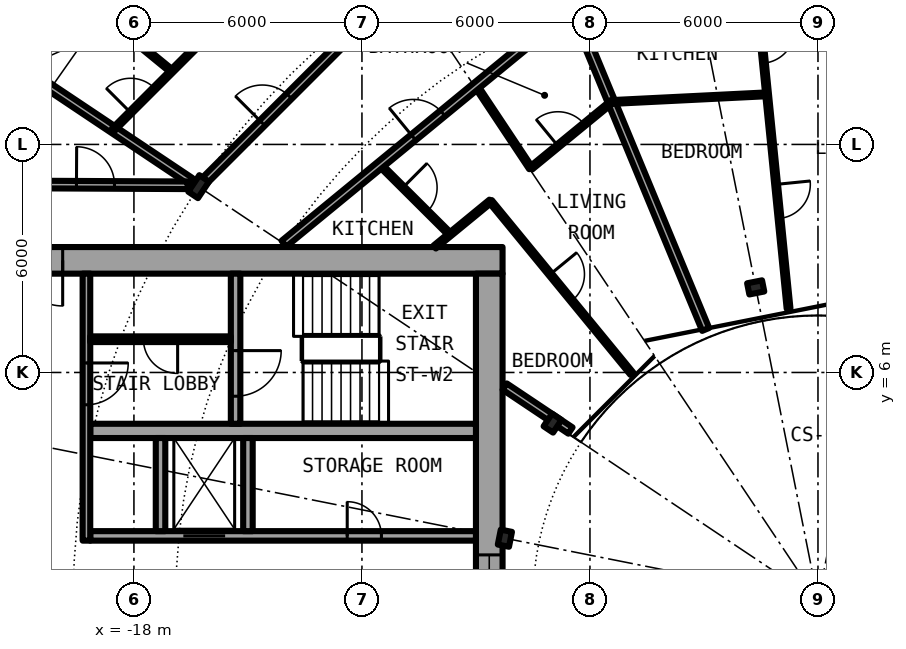
"""IFC4 building model, lengths in metres.
Left out: names, types, materials, properties, quantities, classifications, styles, units other than length and angle.
Written with IfcOpenShell. Run it as: python <this file> out.ifc"""

import sys

from ifc_helpers import new_model, si_unit, direction, frame, frame_2d, origin, origin_2d, place, context, subcontext, project, spatial, rectangle, i_section, extrude, element, fill, save


model = new_model("IFC4")
c1 = context("Model", 3, precision=1e-05, world=origin(), true_north=direction((0.0, 1.0)))
c2 = subcontext(c1, "Body", "Model", "MODEL_VIEW")
j1 = project(units=[si_unit("LENGTHUNIT", "METRE"), si_unit("PLANEANGLEUNIT", "RADIAN")], contexts=[c1])
p1 = place(None, origin())
s1 = spatial("IfcSite", under=j1, at=p1, CompositionType="ELEMENT")
p2 = place(p1, origin())
s2 = spatial("IfcBuilding", under=s1, at=p2, CompositionType="ELEMENT")
p3 = place(p2, frame((0.0, 0.0, 69.7)))
s3 = spatial("IfcBuildingStorey", under=s2, at=p3, CompositionType="ELEMENT", Elevation=69.7)
p4 = place(p3, frame((-16.297, 10.889, 0.0), z_axis=(0.0, 0.0, 1.0), x_axis=(-0.831469612303, 0.55557023302, 0.0)))
e1 = element("IfcColumn", 1, at=p4, inside=s3, PredefinedType="COLUMN", context=c2, shape_type="SweptSolid", body=[
    extrude(i_section(OverallWidth=0.306, OverallDepth=0.524, WebThickness=0.021, FlangeThickness=0.04, FilletRadius=0.027, at=origin_2d()), origin(), (0.0, 0.0, 1.0), 3.05),
])
for number, where, z_axis, x_axis in (
    (2, (-1.639, 8.239, 0.0), (0.0, 0.0, 1.0), (-0.195, 0.981, 0.0)),
    (3, (-6.984, 4.667, 0.0), (0.0, 0.0, 1.0), (-0.831, 0.556, 0.0)),
    (4, (-8.239, 1.639, 0.0), (0.0, 0.0, 1.0), (-0.981, 0.195, 0.0)),
):
    element("IfcColumn", number, at=place(p3, frame(where, z_axis=z_axis, x_axis=x_axis)), inside=s3, PredefinedType="COLUMN", context=c2, shape_type="SweptSolid", body=[
        extrude(i_section(OverallWidth=0.3, OverallDepth=0.4, WebThickness=0.013, FlangeThickness=0.024, FilletRadius=0.027, at=origin_2d()), origin(), (0.0, 0.0, 1.0), 3.05),
    ])
p5 = place(p3, frame((-8.3, 8.95, 0.0), z_axis=(0.0, 0.0, 1.0), x_axis=(-1.0, 0.0, 0.0)))
e5 = element("IfcWall", 5, at=p5, inside=s3, PredefinedType="SHEAR", context=c2, shape_type="SweptSolid", body=[
    extrude(rectangle(XDim=14.0, YDim=0.7, at=frame_2d((7.0, 0.0))), origin(), (0.0, 0.0, 1.0), 3.05),
])
p6 = place(p5, frame((11.575, 0.0, 0.0)))
e6 = element("IfcOpeningElement", 6, at=p6, cuts=e5, PredefinedType="OPENING", context=c2, shape_type="SweptSolid", body=[
    extrude(rectangle(XDim=1.2, YDim=2.3, at=frame_2d((0.6, 1.15))), frame((0.0, 0.36, 0.0), z_axis=(0.0, -1.0, 0.0), x_axis=(1.0, 0.0, 0.0)), (0.0, 0.0, 1.0), 0.72),
])
p7 = place(p3, frame((-8.65, 8.6, 0.0), z_axis=(0.0, 0.0, 1.0), x_axis=(0.0, -1.0, 0.0)))
e7 = element("IfcWall", 7, at=p7, inside=s3, PredefinedType="SHEAR", context=c2, shape_type="SweptSolid", body=[
    extrude(rectangle(XDim=17.2, YDim=0.7, at=frame_2d((8.6, 0.0))), origin(), (0.0, 0.0, 1.0), 3.05),
])
p8 = place(p7, frame((7.4, 0.0, 0.1)))
e8 = element("IfcOpeningElement", 8, at=p8, cuts=e7, PredefinedType="OPENING", context=c2, shape_type="SweptSolid", body=[
    extrude(rectangle(XDim=2.4, YDim=2.2, at=frame_2d((1.2, 1.1))), frame((0.0, 0.36, 0.0), z_axis=(0.0, -1.0, 0.0), x_axis=(1.0, 0.0, 0.0)), (0.0, 0.0, 1.0), 0.72),
])
p9 = place(p3, frame((-19.15, 1.7, 0.0), z_axis=(0.0, 0.0, 1.0), x_axis=(1.0, 0.0, 0.0)))
e9 = element("IfcWall", 9, at=p9, inside=s3, PredefinedType="SHEAR", context=c2, shape_type="SweptSolid", body=[
    extrude(rectangle(XDim=10.15, YDim=0.25, at=frame_2d((5.075, 0.0))), origin(), (0.0, 0.0, 1.0), 3.05),
])
p10 = place(p9, frame((2.45, 0.0, 0.0)))
e10 = element("IfcOpeningElement", 10, at=p10, cuts=e9, PredefinedType="OPENING", context=c2, shape_type="SweptSolid", body=[
    extrude(rectangle(XDim=1.1, YDim=2.3, at=frame_2d((0.55, 1.15))), frame((0.0, 0.135, 0.0), z_axis=(0.0, -1.0, 0.0), x_axis=(1.0, 0.0, 0.0)), (0.0, 0.0, 1.0), 0.27),
])
p11 = place(p9, frame((6.762, 0.0, 0.0)))
e11 = element("IfcOpeningElement", 11, at=p11, cuts=e9, PredefinedType="OPENING", context=c2, shape_type="SweptSolid", body=[
    extrude(rectangle(XDim=0.9, YDim=2.3, at=frame_2d((0.45, 1.15))), frame((0.0, 0.135, 0.0), z_axis=(0.0, -1.0, 0.0), x_axis=(1.0, 0.0, 0.0)), (0.0, 0.0, 1.0), 0.27),
])
p12 = place(p3, frame((-9.0, 4.462, 0.0), z_axis=(0.0, 0.0, 1.0), x_axis=(-1.0, 0.0, 0.0)))
e12 = element("IfcWall", 12, at=p12, inside=s3, PredefinedType="SHEAR", context=c2, shape_type="SweptSolid", body=[
    extrude(rectangle(XDim=10.15, YDim=0.375, at=frame_2d((5.075, 0.0))), origin(), (0.0, 0.0, 1.0), 3.05),
])
p13 = place(p3, frame((-15.325, 8.6, 0.0), z_axis=(0.0, 0.0, 1.0), x_axis=(0.0, -1.0, 0.0)))
e13 = element("IfcWall", 13, at=p13, inside=s3, PredefinedType="SHEAR", context=c2, shape_type="SweptSolid", body=[
    extrude(rectangle(XDim=3.95, YDim=0.25, at=frame_2d((1.975, 0.0))), origin(), (0.0, 0.0, 1.0), 3.05),
])
p14 = place(p13, frame((2.025, 0.0, 0.0)))
e14 = element("IfcOpeningElement", 14, at=p14, cuts=e13, PredefinedType="OPENING", context=c2, shape_type="SweptSolid", body=[
    extrude(rectangle(XDim=1.2, YDim=2.3, at=frame_2d((0.6, 1.15))), frame((0.0, 0.135, 0.0), z_axis=(0.0, -1.0, 0.0), x_axis=(1.0, 0.0, 0.0)), (0.0, 0.0, 1.0), 0.27),
])
for number, where, z_axis, x_axis in (
    (15, (-15.0, 1.825, 0.0), (0.0, 0.0, 1.0), (0.0, 1.0, 0.0)),
    (16, (-17.3, 1.825, 0.0), (0.0, 0.0, 1.0), (0.0, 1.0, 0.0)),
):
    element("IfcWall", number, at=place(p3, frame(where, z_axis=z_axis, x_axis=x_axis)), inside=s3, PredefinedType="SOLIDWALL", context=c2, shape_type="SweptSolid", body=[
        extrude(rectangle(XDim=2.45, YDim=0.25, at=frame_2d((1.225, 0.0))), origin(), (0.0, 0.0, 1.0), 2.7),
    ])
p15 = place(p3, frame((-19.25, 8.6, 0.0), z_axis=(0.0, 0.0, 1.0), x_axis=(0.0, -1.0, 0.0)))
e17 = element("IfcWall", 17, at=p15, inside=s3, PredefinedType="SOLIDWALL", context=c2, shape_type="SweptSolid", body=[
    extrude(rectangle(XDim=7.025, YDim=0.2, at=frame_2d((3.513, 0.0))), origin(), (0.0, 0.0, 1.0), 2.7),
])
p16 = place(p15, frame((2.35, 0.0, 0.0)))
e18 = element("IfcOpeningElement", 18, at=p16, cuts=e17, PredefinedType="OPENING", context=c2, shape_type="SweptSolid", body=[
    extrude(rectangle(XDim=1.1, YDim=2.3, at=frame_2d((0.55, 1.15))), frame((0.0, 0.11, 0.0), z_axis=(0.0, -1.0, 0.0), x_axis=(1.0, 0.0, 0.0)), (0.0, 0.0, 1.0), 0.22),
])
p17 = place(p3, frame((-15.45, 6.875, 0.0), z_axis=(0.0, 0.0, 1.0), x_axis=(-1.0, 0.0, 0.0)))
e19 = element("IfcWall", 19, at=p17, inside=s3, PredefinedType="PARTITIONING", context=c2, shape_type="SweptSolid", body=[
    extrude(rectangle(XDim=3.7, YDim=0.15, at=frame_2d((1.85, 0.0))), origin(), (0.0, 0.0, 1.0), 2.7),
])
p18 = place(p17, frame((1.4, 0.0, 0.0)))
e20 = element("IfcOpeningElement", 20, at=p18, cuts=e19, PredefinedType="OPENING", context=c2, shape_type="SweptSolid", body=[
    extrude(rectangle(XDim=0.9, YDim=2.3, at=frame_2d((0.45, 1.15))), frame((0.0, 0.085, 0.0), z_axis=(0.0, -1.0, 0.0), x_axis=(1.0, 0.0, 0.0)), (0.0, 0.0, 1.0), 0.17),
])
p19 = place(p3, frame((-22.595, 15.098, 0.0), z_axis=(0.0, 0.0, 1.0), x_axis=(0.831382022135, -0.555701298605, 0.0)))
e21 = element("IfcWall", 21, at=p19, inside=s3, PredefinedType="PARTITIONING", context=c2, shape_type="SweptSolid", body=[
    extrude(rectangle(XDim=7.313, YDim=0.2, at=frame_2d((3.657, 0.0))), origin(), (0.0, 0.0, 1.0), 2.7),
])
p20 = place(p3, frame((-21.023, 17.22, 0.0), z_axis=(0.0, 0.0, 1.0), x_axis=(0.773517471898, -0.633774976367, 0.0)))
e22 = element("IfcWall", 22, at=p20, inside=s3, PredefinedType="PARTITIONING", context=c2, shape_type="SweptSolid", body=[
    extrude(rectangle(XDim=5.196, YDim=0.1, at=frame_2d((2.598, 0.0))), origin(), (0.0, 0.0, 1.0), 2.7),
])
p21 = place(p3, frame((-11.524, 11.464, 0.0), z_axis=(0.0, 0.0, 1.0), x_axis=(0.708796844581, -0.705412668665, 0.0)))
e23 = element("IfcWall", 23, at=p21, inside=s3, PredefinedType="PARTITIONING", context=c2, shape_type="SweptSolid", body=[
    extrude(rectangle(XDim=2.597, YDim=0.1, at=frame_2d((1.299, 0.0))), origin(), (0.0, 0.0, 1.0), 2.7),
])
p22 = place(p21, frame((0.849, 0.0, 0.0)))
e24 = element("IfcOpeningElement", 24, at=p22, cuts=e23, PredefinedType="OPENING", context=c2, shape_type="SweptSolid", body=[
    extrude(rectangle(XDim=0.9, YDim=2.3, at=frame_2d((0.45, 1.15))), frame((0.0, 0.06, 0.0), z_axis=(0.0, -1.0, 0.0), x_axis=(1.0, 0.0, 0.0)), (0.0, 0.0, 1.0), 0.12),
])
p23 = place(p3, frame((-8.996, 13.539, 0.0), z_axis=(0.0, 0.0, 1.0), x_axis=(0.553615197403, -0.83277260594, 0.0)))
e25 = element("IfcWall", 25, at=p23, inside=s3, PredefinedType="PARTITIONING", context=c2, shape_type="SweptSolid", body=[
    extrude(rectangle(XDim=2.597, YDim=0.1, at=frame_2d((1.299, 0.0))), origin(), (0.0, 0.0, 1.0), 2.7),
])
p24 = place(p3, frame((-8.62, 10.504, 0.0), z_axis=(0.0, 0.0, 1.0), x_axis=(0.634358693064, -0.773038840249, 0.0)))
e26 = element("IfcWall", 26, at=p24, inside=s3, PredefinedType="PARTITIONING", context=c2, shape_type="SweptSolid", body=[
    extrude(rectangle(XDim=5.868, YDim=0.1, at=frame_2d((2.934, 0.0))), origin(), (0.0, 0.0, 1.0), 2.7),
])
p25 = place(p24, frame((2.484, 0.0, 0.0)))
e27 = element("IfcOpeningElement", 27, at=p25, cuts=e26, PredefinedType="OPENING", context=c2, shape_type="SweptSolid", body=[
    extrude(rectangle(XDim=0.9, YDim=2.3, at=frame_2d((0.45, 1.15))), frame((0.0, 0.06, 0.0), z_axis=(0.0, -1.0, 0.0), x_axis=(1.0, 0.0, 0.0)), (0.0, 0.0, 1.0), 0.12),
])
p26 = place(p3, frame((-6.468, 15.614, 0.0), z_axis=(0.0, 0.0, 1.0), x_axis=(0.382646942224, -0.923894646378, 0.0)))
e28 = element("IfcWall", 28, at=p26, inside=s3, PredefinedType="PARTITIONING", context=c2, shape_type="SweptSolid", body=[
    extrude(rectangle(XDim=9.181, YDim=0.2, at=frame_2d((4.59, 0.0))), origin(), (0.0, 0.0, 1.0), 2.7),
])
p27 = place(p3, frame((-1.593, 15.853, 0.0), z_axis=(0.0, 0.0, 1.0), x_axis=(0.099730339513, -0.995014502096, 0.0)))
e29 = element("IfcWall", 29, at=p27, inside=s3, PredefinedType="PARTITIONING", context=c2, shape_type="SweptSolid", body=[
    extrude(rectangle(XDim=8.213, YDim=0.1, at=frame_2d((4.106, 0.0))), origin(), (0.0, 0.0, 1.0), 2.7),
])
p28 = place(p27, frame((0.823, 0.0, 0.0)))
e30 = element("IfcOpeningElement", 30, at=p28, cuts=e29, PredefinedType="OPENING", context=c2, shape_type="SweptSolid", body=[
    extrude(rectangle(XDim=0.9, YDim=2.3, at=frame_2d((0.45, 1.15))), frame((0.0, 0.06, 0.0), z_axis=(0.0, -1.0, 0.0), x_axis=(1.0, 0.0, 0.0)), (0.0, 0.0, 1.0), 0.12),
])
p29 = place(p27, frame((4.929, 0.0, 0.0)))
e31 = element("IfcOpeningElement", 31, at=p29, cuts=e29, PredefinedType="OPENING", context=c2, shape_type="SweptSolid", body=[
    extrude(rectangle(XDim=0.9, YDim=2.3, at=frame_2d((0.45, 1.15))), frame((0.0, 0.06, 0.0), z_axis=(0.0, -1.0, 0.0), x_axis=(1.0, 0.0, 0.0)), (0.0, 0.0, 1.0), 0.12),
])
p30 = place(p3, frame((-6.513, 4.472, 0.0), z_axis=(0.0, 0.0, 1.0), x_axis=(-0.831382204863, 0.555701025225, 0.0)))
e32 = element("IfcWall", 32, at=p30, inside=s3, PredefinedType="PARTITIONING", context=c2, shape_type="SweptSolid", body=[
    extrude(rectangle(XDim=2.082, YDim=0.2, at=frame_2d((1.041, 0.0))), origin(), (0.0, 0.0, 1.0), 2.7),
])
p31 = place(p3, frame((-21.675, 10.95, 0.0), z_axis=(0.0, 0.0, 1.0), x_axis=(0.999988019025, -0.004895079807, 0.0)))
e33 = element("IfcWall", 33, at=p31, inside=s3, PredefinedType="PARTITIONING", context=c2, shape_type="SweptSolid", body=[
    extrude(rectangle(XDim=5.087, YDim=0.2, at=frame_2d((2.543, 0.0))), origin(), (0.0, 0.0, 1.0), 2.7),
])
p32 = place(p31, frame((2.163, 0.0, 0.0)))
e34 = element("IfcOpeningElement", 34, at=p32, cuts=e33, PredefinedType="OPENING", context=c2, shape_type="SweptSolid", body=[
    extrude(rectangle(XDim=1.0, YDim=2.3, at=frame_2d((0.5, 1.15))), frame((0.0, 0.11, 0.0), z_axis=(0.0, -1.0, 0.0), x_axis=(1.0, 0.0, 0.0)), (0.0, 0.0, 1.0), 0.22),
])
p33 = place(p3, frame((-5.439, 13.116, 0.0), z_axis=(0.0, 0.0, 1.0), x_axis=(0.998772010578, 0.049542616872, 0.0)))
e35 = element("IfcWall", 35, at=p33, inside=s3, PredefinedType="PARTITIONING", context=c2, shape_type="SweptSolid", body=[
    extrude(rectangle(XDim=4.1, YDim=0.1, at=frame_2d((2.05, 0.0))), origin(), (0.0, 0.0, 1.0), 2.7),
])
p34 = place(p3, frame((-10.087, 9.3, 0.0), z_axis=(0.0, 0.0, 1.0), x_axis=(0.772957368531, 0.6344579627, 0.0)))
e36 = element("IfcWall", 36, at=p34, inside=s3, PredefinedType="PARTITIONING", context=c2, shape_type="SweptSolid", body=[
    extrude(rectangle(XDim=1.906, YDim=0.1, at=frame_2d((0.953, 0.0))), origin(), (0.0, 0.0, 1.0), 2.7),
])
p35 = place(p3, frame((-7.552, 11.379, 0.0), z_axis=(0.0, 0.0, 1.0), x_axis=(0.773323547924, 0.634011585246, 0.0)))
e37 = element("IfcWall", 37, at=p35, inside=s3, PredefinedType="PARTITIONING", context=c2, shape_type="SweptSolid", body=[
    extrude(rectangle(XDim=2.748, YDim=0.1, at=frame_2d((1.374, 0.0))), origin(), (0.0, 0.0, 1.0), 2.7),
])
p36 = place(p35, frame((0.917, 0.0, 0.0)))
e38 = element("IfcOpeningElement", 38, at=p36, cuts=e37, PredefinedType="OPENING", context=c2, shape_type="SweptSolid", body=[
    extrude(rectangle(XDim=0.9, YDim=2.3, at=frame_2d((0.45, 1.15))), frame((0.0, 0.06, 0.0), z_axis=(0.0, -1.0, 0.0), x_axis=(1.0, 0.0, 0.0)), (0.0, 0.0, 1.0), 0.12),
])
p37 = place(p3, frame((-14.052, 9.389, 0.0), z_axis=(0.0, 0.0, 1.0), x_axis=(0.77292501819, 0.634497372931, 0.0)))
e39 = element("IfcWall", 39, at=p37, inside=s3, PredefinedType="PARTITIONING", context=c2, shape_type="SweptSolid", body=[
    extrude(rectangle(XDim=9.81, YDim=0.2, at=frame_2d((4.905, 0.0))), origin(), (0.0, 0.0, 1.0), 2.7),
])
p38 = place(p37, frame((4.406, 0.0, 0.0)))
e40 = element("IfcOpeningElement", 40, at=p38, cuts=e39, PredefinedType="OPENING", context=c2, shape_type="SweptSolid", body=[
    extrude(rectangle(XDim=1.0, YDim=2.3, at=frame_2d((0.5, 1.15))), frame((0.0, 0.11, 0.0), z_axis=(0.0, -1.0, 0.0), x_axis=(1.0, 0.0, 0.0)), (0.0, 0.0, 1.0), 0.22),
])
p39 = place(p3, frame((-16.186, 11.0, 0.0), z_axis=(0.0, 0.0, 1.0), x_axis=(0.707106781187, 0.707106781187, 0.0)))
e41 = element("IfcWall", 41, at=p39, inside=s3, PredefinedType="PARTITIONING", context=c2, shape_type="SweptSolid", body=[
    extrude(rectangle(XDim=7.334, YDim=0.2, at=frame_2d((3.667, 0.0))), origin(), (0.0, 0.0, 1.0), 2.38),
])
p40 = place(p39, frame((2.211, 0.0, 0.0)))
e42 = element("IfcOpeningElement", 42, at=p40, cuts=e41, PredefinedType="OPENING", context=c2, shape_type="SweptSolid", body=[
    extrude(rectangle(XDim=1.0, YDim=2.3, at=frame_2d((0.5, 1.15))), frame((0.0, 0.11, 0.0), z_axis=(0.0, -1.0, 0.0), x_axis=(1.0, 0.0, 0.0)), (0.0, 0.0, 1.0), 0.22),
])
p41 = place(p3, frame((-18.542, 12.389, 0.0), z_axis=(0.0, 0.0, 1.0), x_axis=(0.707190945535, 0.707022606819, 0.0)))
e43 = element("IfcWall", 43, at=p41, inside=s3, PredefinedType="PARTITIONING", context=c2, shape_type="SweptSolid", body=[
    extrude(rectangle(XDim=4.351, YDim=0.1, at=frame_2d((2.175, 0.0))), origin(), (0.0, 0.0, 1.0), 2.7),
])
p42 = place(p41, frame((0.639, 0.0, 0.0)))
e44 = element("IfcOpeningElement", 44, at=p42, cuts=e43, PredefinedType="OPENING", context=c2, shape_type="SweptSolid", body=[
    extrude(rectangle(XDim=0.9, YDim=2.3, at=frame_2d((0.45, 1.15))), frame((0.0, 0.06, 0.0), z_axis=(0.0, -1.0, 0.0), x_axis=(1.0, 0.0, 0.0)), (0.0, 0.0, 1.0), 0.12),
])
p43 = place(p10, origin())
e45 = element("IfcDoor", 45, at=p43, inside=s3, OperationType="DOUBLE_DOOR_SLIDING", PredefinedType="DOOR", context=c2, shape_type="SweptSolid", body=[
    extrude(rectangle(XDim=1.1, YDim=2.3, at=frame_2d((0.55, 1.15))), frame((0.0, 0.025, 0.0), z_axis=(0.0, -1.0, 0.0), x_axis=(1.0, 0.0, 0.0)), (0.0, 0.0, 1.0), 0.05),
])
fill(e10, e45)
p44 = place(p11, origin())
e46 = element("IfcDoor", 46, at=p44, inside=s3, OperationType="SINGLE_SWING_LEFT", PredefinedType="DOOR", context=c2, shape_type="SweptSolid", body=[
    extrude(rectangle(XDim=0.9, YDim=2.3, at=frame_2d((0.45, 1.15))), frame((0.0, 0.025, 0.0), z_axis=(0.0, -1.0, 0.0), x_axis=(1.0, 0.0, 0.0)), (0.0, 0.0, 1.0), 0.05),
])
fill(e11, e46)
p45 = place(p18, origin())
e47 = element("IfcDoor", 47, at=p45, inside=s3, OperationType="SINGLE_SWING_LEFT", PredefinedType="DOOR", context=c2, shape_type="SweptSolid", body=[
    extrude(rectangle(XDim=0.9, YDim=2.3, at=frame_2d((0.45, 1.15))), frame((0.0, 0.025, 0.0), z_axis=(0.0, -1.0, 0.0), x_axis=(1.0, 0.0, 0.0)), (0.0, 0.0, 1.0), 0.05),
])
fill(e20, e47)
p46 = place(p14, origin())
e48 = element("IfcDoor", 48, at=p46, inside=s3, OperationType="SINGLE_SWING_LEFT", PredefinedType="DOOR", context=c2, shape_type="SweptSolid", body=[
    extrude(rectangle(XDim=1.2, YDim=2.3, at=frame_2d((0.6, 1.15))), frame((0.0, 0.025, 0.0), z_axis=(0.0, -1.0, 0.0), x_axis=(1.0, 0.0, 0.0)), (0.0, 0.0, 1.0), 0.05),
])
fill(e14, e48)
p47 = place(p16, origin())
e49 = element("IfcDoor", 49, at=p47, inside=s3, OperationType="SINGLE_SWING_RIGHT", PredefinedType="DOOR", context=c2, shape_type="SweptSolid", body=[
    extrude(rectangle(XDim=1.1, YDim=2.3, at=frame_2d((0.55, 1.15))), frame((0.0, 0.025, 0.0), z_axis=(0.0, -1.0, 0.0), x_axis=(1.0, 0.0, 0.0)), (0.0, 0.0, 1.0), 0.05),
])
fill(e18, e49)
p48 = place(p6, origin())
e50 = element("IfcDoor", 50, at=p48, inside=s3, OperationType="SINGLE_SWING_LEFT", PredefinedType="DOOR", context=c2, shape_type="SweptSolid", body=[
    extrude(rectangle(XDim=1.2, YDim=2.3, at=frame_2d((0.6, 1.15))), frame((0.0, 0.025, 0.0), z_axis=(0.0, -1.0, 0.0), x_axis=(1.0, 0.0, 0.0)), (0.0, 0.0, 1.0), 0.05),
])
fill(e6, e50)
p49 = place(p8, origin())
e51 = element("IfcWindow", 51, at=p49, inside=s3, PartitioningType="SINGLE_PANEL", PredefinedType="WINDOW", context=c2, shape_type="SweptSolid", body=[
    extrude(rectangle(XDim=2.4, YDim=2.2, at=frame_2d((1.2, 1.1))), frame((0.0, 0.03, 0.0), z_axis=(0.0, -1.0, 0.0), x_axis=(1.0, 0.0, 0.0)), (0.0, 0.0, 1.0), 0.06),
])
fill(e8, e51)
p50 = place(p40, origin())
e52 = element("IfcDoor", 52, at=p50, inside=s3, OperationType="SINGLE_SWING_LEFT", PredefinedType="DOOR", context=c2, shape_type="SweptSolid", body=[
    extrude(rectangle(XDim=1.0, YDim=2.3, at=frame_2d((0.5, 1.15))), frame((0.0, 0.025, 0.0), z_axis=(0.0, -1.0, 0.0), x_axis=(1.0, 0.0, 0.0)), (0.0, 0.0, 1.0), 0.05),
])
fill(e42, e52)
p51 = place(p42, origin())
e53 = element("IfcDoor", 53, at=p51, inside=s3, OperationType="SINGLE_SWING_LEFT", PredefinedType="DOOR", context=c2, shape_type="SweptSolid", body=[
    extrude(rectangle(XDim=0.9, YDim=2.3, at=frame_2d((0.45, 1.15))), frame((0.0, 0.025, 0.0), z_axis=(0.0, -1.0, 0.0), x_axis=(1.0, 0.0, 0.0)), (0.0, 0.0, 1.0), 0.05),
])
fill(e44, e53)
p52 = place(p28, origin())
e54 = element("IfcDoor", 54, at=p52, inside=s3, OperationType="SINGLE_SWING_LEFT", PredefinedType="DOOR", context=c2, shape_type="SweptSolid", body=[
    extrude(rectangle(XDim=0.9, YDim=2.3, at=frame_2d((0.45, 1.15))), frame((0.0, 0.025, 0.0), z_axis=(0.0, -1.0, 0.0), x_axis=(1.0, 0.0, 0.0)), (0.0, 0.0, 1.0), 0.05),
])
fill(e30, e54)
p53 = place(p29, origin())
e55 = element("IfcDoor", 55, at=p53, inside=s3, OperationType="SINGLE_SWING_RIGHT", PredefinedType="DOOR", context=c2, shape_type="SweptSolid", body=[
    extrude(rectangle(XDim=0.9, YDim=2.3, at=frame_2d((0.45, 1.15))), frame((0.0, 0.025, 0.0), z_axis=(0.0, -1.0, 0.0), x_axis=(1.0, 0.0, 0.0)), (0.0, 0.0, 1.0), 0.05),
])
fill(e31, e55)
p54 = place(p38, origin())
e56 = element("IfcDoor", 56, at=p54, inside=s3, OperationType="SINGLE_SWING_RIGHT", PredefinedType="DOOR", context=c2, shape_type="SweptSolid", body=[
    extrude(rectangle(XDim=1.0, YDim=2.3, at=frame_2d((0.5, 1.15))), frame((0.0, 0.025, 0.0), z_axis=(0.0, -1.0, 0.0), x_axis=(1.0, 0.0, 0.0)), (0.0, 0.0, 1.0), 0.05),
])
fill(e40, e56)
p55 = place(p36, origin())
e57 = element("IfcDoor", 57, at=p55, inside=s3, OperationType="SINGLE_SWING_LEFT", PredefinedType="DOOR", context=c2, shape_type="SweptSolid", body=[
    extrude(rectangle(XDim=0.9, YDim=2.3, at=frame_2d((0.45, 1.15))), frame((0.0, 0.025, 0.0), z_axis=(0.0, -1.0, 0.0), x_axis=(1.0, 0.0, 0.0)), (0.0, 0.0, 1.0), 0.05),
])
fill(e38, e57)
p56 = place(p22, origin())
e58 = element("IfcDoor", 58, at=p56, inside=s3, OperationType="SINGLE_SWING_RIGHT", PredefinedType="DOOR", context=c2, shape_type="SweptSolid", body=[
    extrude(rectangle(XDim=0.9, YDim=2.3, at=frame_2d((0.45, 1.15))), frame((0.0, 0.025, 0.0), z_axis=(0.0, -1.0, 0.0), x_axis=(1.0, 0.0, 0.0)), (0.0, 0.0, 1.0), 0.05),
])
fill(e24, e58)
p57 = place(p25, origin())
e59 = element("IfcDoor", 59, at=p57, inside=s3, OperationType="SINGLE_SWING_RIGHT", PredefinedType="DOOR", context=c2, shape_type="SweptSolid", body=[
    extrude(rectangle(XDim=0.9, YDim=2.3, at=frame_2d((0.45, 1.15))), frame((0.0, 0.025, 0.0), z_axis=(0.0, -1.0, 0.0), x_axis=(1.0, 0.0, 0.0)), (0.0, 0.0, 1.0), 0.05),
])
fill(e27, e59)
p58 = place(p32, origin())
e60 = element("IfcDoor", 60, at=p58, inside=s3, OperationType="SINGLE_SWING_RIGHT", PredefinedType="DOOR", context=c2, shape_type="SweptSolid", body=[
    extrude(rectangle(XDim=1.0, YDim=2.3, at=frame_2d((0.5, 1.15))), frame((0.0, 0.025, 0.0), z_axis=(0.0, -1.0, 0.0), x_axis=(1.0, 0.0, 0.0)), (0.0, 0.0, 1.0), 0.05),
])
fill(e34, e60)
save(model, sys.argv[1])
